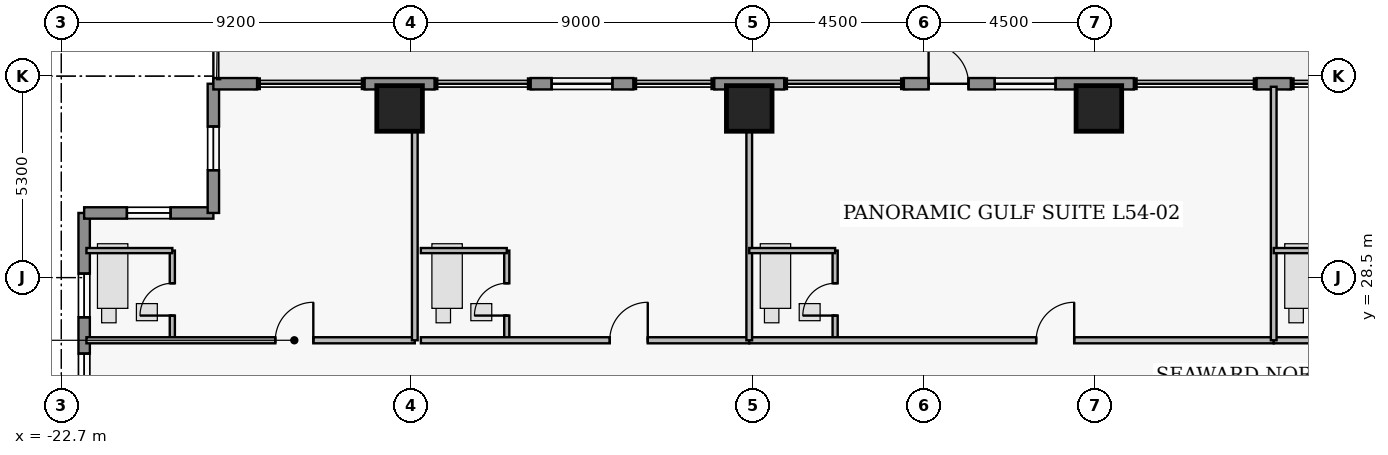
"""IFC4 building model, lengths in metres.
Left out: names, types, materials, properties, quantities, classifications, styles, units other than length and angle.
Written with IfcOpenShell. Run it as: python <this file> out.ifc"""

import sys

from ifc_helpers import new_model, si_unit, direction, frame, frame_2d, origin, origin_2d, place, context, subcontext, project, spatial, rectangle, extrude, element, fill, save


model = new_model("IFC4")
c1 = context("Model", 3, precision=1e-05, world=origin(), true_north=direction((0.0, 1.0)))
c2 = subcontext(c1, "Body", "Model", "MODEL_VIEW")
j1 = project(units=[si_unit("LENGTHUNIT", "METRE"), si_unit("PLANEANGLEUNIT", "RADIAN")], contexts=[c1])
p1 = place(None, origin())
s1 = spatial("IfcSite", under=j1, at=p1, CompositionType="ELEMENT")
p2 = place(p1, origin())
s2 = spatial("IfcBuilding", under=s1, at=p2, CompositionType="ELEMENT")
p3 = place(p2, frame((0.0, 0.0, 214.9)))
s3 = spatial("IfcBuildingStorey", under=s2, at=p3, CompositionType="ELEMENT", Elevation=214.9)
for number, where, z_axis, x_axis in (
    (1, (-13.8, 32.95, 0.0), (0.0, 0.0, 1.0), (1.0, 0.0, 0.0)),
    (2, (-4.6, 32.95, 0.0), (0.0, 0.0, 1.0), (1.0, 0.0, 0.0)),
    (3, (4.6, 32.95, 0.0), (0.0, 0.0, 1.0), (1.0, 0.0, 0.0)),
):
    element("IfcColumn", number, at=place(p3, frame(where, z_axis=z_axis, x_axis=x_axis)), inside=s3, PredefinedType="COLUMN", context=c2, shape_type="SweptSolid", body=[
        extrude(rectangle(XDim=1.2, YDim=1.2, at=origin_2d()), origin(), (0.0, 0.0, 1.0), 3.75),
    ])
p4 = place(p3, frame((-22.1, 24.55, 0.0), z_axis=(0.0, 0.0, 1.0), x_axis=(0.0, 1.0, 0.0)))
e4 = element("IfcWall", 4, at=p4, inside=s3, PredefinedType="STANDARD", context=c2, shape_type="SweptSolid", body=[
    extrude(rectangle(XDim=5.65, YDim=0.3, at=frame_2d((2.825, 0.0))), origin(), (0.0, 0.0, 1.0), 3.53),
])
p5 = place(p4, frame((0.8, 0.0, 0.95)))
e5 = element("IfcOpeningElement", 5, at=p5, cuts=e4, PredefinedType="OPENING", context=c2, shape_type="SweptSolid", body=[
    extrude(rectangle(XDim=1.15, YDim=1.55, at=frame_2d((0.575, 0.775))), frame((0.0, 0.16, 0.0), z_axis=(0.0, -1.0, 0.0), x_axis=(1.0, 0.0, 0.0)), (0.0, 0.0, 1.0), 0.32),
])
p6 = place(p4, frame((2.905, 0.0, 0.95)))
e6 = element("IfcOpeningElement", 6, at=p6, cuts=e4, PredefinedType="OPENING", context=c2, shape_type="SweptSolid", body=[
    extrude(rectangle(XDim=1.15, YDim=1.55, at=frame_2d((0.575, 0.775))), frame((0.0, 0.16, 0.0), z_axis=(0.0, -1.0, 0.0), x_axis=(1.0, 0.0, 0.0)), (0.0, 0.0, 1.0), 0.32),
])
p7 = place(p3, frame((-22.1, 30.2, 0.0), z_axis=(0.0, 0.0, 1.0), x_axis=(1.0, 0.0, 0.0)))
e7 = element("IfcWall", 7, at=p7, inside=s3, PredefinedType="STANDARD", context=c2, shape_type="SweptSolid", body=[
    extrude(rectangle(XDim=3.4, YDim=0.3, at=frame_2d((1.7, 0.0))), origin(), (0.0, 0.0, 1.0), 3.53),
])
p8 = place(p7, frame((1.125, 0.0, 1.25)))
e8 = element("IfcOpeningElement", 8, at=p8, cuts=e7, PredefinedType="OPENING", context=c2, shape_type="SweptSolid", body=[
    extrude(rectangle(XDim=1.15, YDim=1.55, at=frame_2d((0.575, 0.775))), frame((0.0, 0.16, 0.0), z_axis=(0.0, -1.0, 0.0), x_axis=(1.0, 0.0, 0.0)), (0.0, 0.0, 1.0), 0.32),
])
p9 = place(p3, frame((-18.7, 30.2, 0.0), z_axis=(0.0, 0.0, 1.0), x_axis=(0.0, 1.0, 0.0)))
e9 = element("IfcWall", 9, at=p9, inside=s3, PredefinedType="STANDARD", context=c2, shape_type="SweptSolid", body=[
    extrude(rectangle(XDim=3.4, YDim=0.3, at=frame_2d((1.7, 0.0))), origin(), (0.0, 0.0, 1.0), 3.53),
])
p10 = place(p9, frame((1.125, 0.0, 1.25)))
e10 = element("IfcOpeningElement", 10, at=p10, cuts=e9, PredefinedType="OPENING", context=c2, shape_type="SweptSolid", body=[
    extrude(rectangle(XDim=1.15, YDim=1.55, at=frame_2d((0.575, 0.775))), frame((0.0, 0.16, 0.0), z_axis=(0.0, -1.0, 0.0), x_axis=(1.0, 0.0, 0.0)), (0.0, 0.0, 1.0), 0.32),
])
p11 = place(p3, frame((-18.7, 33.6, 0.0), z_axis=(0.0, 0.0, 1.0), x_axis=(1.0, 0.0, 0.0)))
e11 = element("IfcWall", 11, at=p11, inside=s3, PredefinedType="STANDARD", context=c2, shape_type="SweptSolid", body=[
    extrude(rectangle(XDim=1.15, YDim=0.3, at=frame_2d((0.575, 0.0))), origin(), (0.0, 0.0, 1.0), 3.53),
])
p12 = place(p3, frame((-14.72, 33.6, 0.0), z_axis=(0.0, 0.0, 1.0), x_axis=(1.0, 0.0, 0.0)))
e12 = element("IfcWall", 12, at=p12, inside=s3, PredefinedType="STANDARD", context=c2, shape_type="SweptSolid", body=[
    extrude(rectangle(XDim=1.84, YDim=0.3, at=frame_2d((0.92, 0.0))), origin(), (0.0, 0.0, 1.0), 3.53),
])
p13 = place(p3, frame((-10.35, 33.6, 0.0), z_axis=(0.0, 0.0, 1.0), x_axis=(1.0, 0.0, 0.0)))
e13 = element("IfcWall", 13, at=p13, inside=s3, PredefinedType="STANDARD", context=c2, shape_type="SweptSolid", body=[
    extrude(rectangle(XDim=2.7, YDim=0.3, at=frame_2d((1.35, 0.0))), origin(), (0.0, 0.0, 1.0), 3.53),
])
p14 = place(p13, frame((0.55, 0.0, 0.85)))
e14 = element("IfcOpeningElement", 14, at=p14, cuts=e13, PredefinedType="OPENING", context=c2, shape_type="SweptSolid", body=[
    extrude(rectangle(XDim=1.6, YDim=1.8, at=frame_2d((0.8, 0.9))), frame((0.0, 0.16, 0.0), z_axis=(0.0, -1.0, 0.0), x_axis=(1.0, 0.0, 0.0)), (0.0, 0.0, 1.0), 0.32),
])
p15 = place(p3, frame((-5.52, 33.6, 0.0), z_axis=(0.0, 0.0, 1.0), x_axis=(1.0, 0.0, 0.0)))
e15 = element("IfcWall", 15, at=p15, inside=s3, PredefinedType="STANDARD", context=c2, shape_type="SweptSolid", body=[
    extrude(rectangle(XDim=1.84, YDim=0.3, at=frame_2d((0.92, 0.0))), origin(), (0.0, 0.0, 1.0), 3.53),
])
p16 = place(p3, frame((-0.531, 33.6, 0.0), z_axis=(0.0, 0.0, 1.0), x_axis=(1.0, 0.0, 0.0)))
e16 = element("IfcWall", 16, at=p16, inside=s3, PredefinedType="STANDARD", context=c2, shape_type="SweptSolid", body=[
    extrude(rectangle(XDim=6.051, YDim=0.3, at=frame_2d((3.025, 0.0))), origin(), (0.0, 0.0, 1.0), 3.53),
])
p17 = place(p16, frame((0.65, 0.0, 0.0)))
e17 = element("IfcOpeningElement", 17, at=p17, cuts=e16, PredefinedType="OPENING", context=c2, shape_type="SweptSolid", body=[
    extrude(rectangle(XDim=1.05, YDim=2.2, at=frame_2d((0.525, 1.1))), frame((0.0, 0.16, 0.0), z_axis=(0.0, -1.0, 0.0), x_axis=(1.0, 0.0, 0.0)), (0.0, 0.0, 1.0), 0.32),
])
p18 = place(p16, frame((2.39, 0.0, 0.85)))
e18 = element("IfcOpeningElement", 18, at=p18, cuts=e16, PredefinedType="OPENING", context=c2, shape_type="SweptSolid", body=[
    extrude(rectangle(XDim=1.6, YDim=1.8, at=frame_2d((0.8, 0.9))), frame((0.0, 0.16, 0.0), z_axis=(0.0, -1.0, 0.0), x_axis=(1.0, 0.0, 0.0)), (0.0, 0.0, 1.0), 0.32),
])
p19 = place(p3, frame((8.75, 33.6, 0.0), z_axis=(0.0, 0.0, 1.0), x_axis=(1.0, 0.0, 0.0)))
e19 = element("IfcWall", 19, at=p19, inside=s3, PredefinedType="STANDARD", context=c2, shape_type="SweptSolid", body=[
    extrude(rectangle(XDim=0.9, YDim=0.3, at=frame_2d((0.45, 0.0))), origin(), (0.0, 0.0, 1.0), 3.53),
])
p20 = place(p3, frame((-19.78, 26.85, 0.0), z_axis=(0.0, 0.0, 1.0), x_axis=(0.0, 1.0, 0.0)))
e20 = element("IfcWall", 20, at=p20, inside=s3, PredefinedType="PLUMBINGWALL", context=c2, shape_type="SweptSolid", body=[
    extrude(rectangle(XDim=2.36, YDim=0.135, at=frame_2d((1.18, 0.0))), origin(), (0.0, 0.0, 1.0), 3.53),
])
p21 = place(p20, frame((0.65, 0.0, 0.0)))
e21 = element("IfcOpeningElement", 21, at=p21, cuts=e20, PredefinedType="OPENING", context=c2, shape_type="SweptSolid", body=[
    extrude(rectangle(XDim=0.85, YDim=2.1, at=frame_2d((0.425, 1.05))), frame((0.0, 0.077, 0.0), z_axis=(0.0, -1.0, 0.0), x_axis=(1.0, 0.0, 0.0)), (0.0, 0.0, 1.0), 0.155),
])
p22 = place(p3, frame((-22.04, 26.85, 0.0), z_axis=(0.0, 0.0, 1.0), x_axis=(1.0, 0.0, 0.0)))
e22 = element("IfcWall", 22, at=p22, inside=s3, PredefinedType="PARTITIONING", context=c2, shape_type="SweptSolid", body=[
    extrude(rectangle(XDim=8.64, YDim=0.16, at=frame_2d((4.32, 0.0))), origin(), (0.0, 0.0, 1.0), 3.53),
])
p23 = place(p22, frame((4.97, 0.0, 0.0)))
e23 = element("IfcOpeningElement", 23, at=p23, cuts=e22, PredefinedType="OPENING", context=c2, shape_type="SweptSolid", body=[
    extrude(rectangle(XDim=1.0, YDim=2.15, at=frame_2d((0.5, 1.075))), frame((0.0, 0.09, 0.0), z_axis=(0.0, -1.0, 0.0), x_axis=(1.0, 0.0, 0.0)), (0.0, 0.0, 1.0), 0.18),
])
p24 = place(p3, frame((-10.98, 26.85, 0.0), z_axis=(0.0, 0.0, 1.0), x_axis=(0.0, 1.0, 0.0)))
e24 = element("IfcWall", 24, at=p24, inside=s3, PredefinedType="PLUMBINGWALL", context=c2, shape_type="SweptSolid", body=[
    extrude(rectangle(XDim=2.36, YDim=0.135, at=frame_2d((1.18, 0.0))), origin(), (0.0, 0.0, 1.0), 3.53),
])
p25 = place(p24, frame((0.65, 0.0, 0.0)))
e25 = element("IfcOpeningElement", 25, at=p25, cuts=e24, PredefinedType="OPENING", context=c2, shape_type="SweptSolid", body=[
    extrude(rectangle(XDim=0.85, YDim=2.1, at=frame_2d((0.425, 1.05))), frame((0.0, 0.077, 0.0), z_axis=(0.0, -1.0, 0.0), x_axis=(1.0, 0.0, 0.0)), (0.0, 0.0, 1.0), 0.155),
])
p26 = place(p3, frame((-13.24, 26.85, 0.0), z_axis=(0.0, 0.0, 1.0), x_axis=(1.0, 0.0, 0.0)))
e26 = element("IfcWall", 26, at=p26, inside=s3, PredefinedType="PARTITIONING", context=c2, shape_type="SweptSolid", body=[
    extrude(rectangle(XDim=8.64, YDim=0.16, at=frame_2d((4.32, 0.0))), origin(), (0.0, 0.0, 1.0), 3.53),
])
p27 = place(p26, frame((4.97, 0.0, 0.0)))
e27 = element("IfcOpeningElement", 27, at=p27, cuts=e26, PredefinedType="OPENING", context=c2, shape_type="SweptSolid", body=[
    extrude(rectangle(XDim=1.0, YDim=2.15, at=frame_2d((0.5, 1.075))), frame((0.0, 0.09, 0.0), z_axis=(0.0, -1.0, 0.0), x_axis=(1.0, 0.0, 0.0)), (0.0, 0.0, 1.0), 0.18),
])
p28 = place(p3, frame((-2.34, 26.85, 0.0), z_axis=(0.0, 0.0, 1.0), x_axis=(0.0, 1.0, 0.0)))
e28 = element("IfcWall", 28, at=p28, inside=s3, PredefinedType="PLUMBINGWALL", context=c2, shape_type="SweptSolid", body=[
    extrude(rectangle(XDim=2.36, YDim=0.135, at=frame_2d((1.18, 0.0))), origin(), (0.0, 0.0, 1.0), 3.53),
])
p29 = place(p28, frame((0.65, 0.0, 0.0)))
e29 = element("IfcOpeningElement", 29, at=p29, cuts=e28, PredefinedType="OPENING", context=c2, shape_type="SweptSolid", body=[
    extrude(rectangle(XDim=0.85, YDim=2.1, at=frame_2d((0.425, 1.05))), frame((0.0, 0.077, 0.0), z_axis=(0.0, -1.0, 0.0), x_axis=(1.0, 0.0, 0.0)), (0.0, 0.0, 1.0), 0.155),
])
p30 = place(p3, frame((-4.6, 26.85, 0.0), z_axis=(0.0, 0.0, 1.0), x_axis=(1.0, 0.0, 0.0)))
e30 = element("IfcWall", 30, at=p30, inside=s3, PredefinedType="PARTITIONING", context=c2, shape_type="SweptSolid", body=[
    extrude(rectangle(XDim=13.8, YDim=0.16, at=frame_2d((6.9, 0.0))), origin(), (0.0, 0.0, 1.0), 3.53),
])
p31 = place(p30, frame((7.55, 0.0, 0.0)))
e31 = element("IfcOpeningElement", 31, at=p31, cuts=e30, PredefinedType="OPENING", context=c2, shape_type="SweptSolid", body=[
    extrude(rectangle(XDim=1.0, YDim=2.15, at=frame_2d((0.5, 1.075))), frame((0.0, 0.09, 0.0), z_axis=(0.0, -1.0, 0.0), x_axis=(1.0, 0.0, 0.0)), (0.0, 0.0, 1.0), 0.18),
])
p32 = place(p3, frame((9.2, 26.85, 0.0), z_axis=(0.0, 0.0, 1.0), x_axis=(1.0, 0.0, 0.0)))
e32 = element("IfcWall", 32, at=p32, inside=s3, PredefinedType="PARTITIONING", context=c2, shape_type="SweptSolid", body=[
    extrude(rectangle(XDim=12.84, YDim=0.16, at=frame_2d((6.42, 0.0))), origin(), (0.0, 0.0, 1.0), 3.53),
])
p33 = place(p32, frame((7.07, 0.0, 0.0)))
e33 = element("IfcOpeningElement", 33, at=p33, cuts=e32, PredefinedType="OPENING", context=c2, shape_type="SweptSolid", body=[
    extrude(rectangle(XDim=1.0, YDim=2.15, at=frame_2d((0.5, 1.075))), frame((0.0, 0.09, 0.0), z_axis=(0.0, -1.0, 0.0), x_axis=(1.0, 0.0, 0.0)), (0.0, 0.0, 1.0), 0.18),
])
p34 = place(p3, frame((-22.04, 29.21, 0.0), z_axis=(0.0, 0.0, 1.0), x_axis=(1.0, 0.0, 0.0)))
e34 = element("IfcWall", 34, at=p34, inside=s3, PredefinedType="PLUMBINGWALL", context=c2, shape_type="SweptSolid", body=[
    extrude(rectangle(XDim=2.26, YDim=0.135, at=frame_2d((1.13, 0.0))), origin(), (0.0, 0.0, 1.0), 3.53),
])
p35 = place(p3, frame((-13.4, 26.85, 0.0), z_axis=(0.0, 0.0, 1.0), x_axis=(0.0, 1.0, 0.0)))
e35 = element("IfcWall", 35, at=p35, inside=s3, PredefinedType="PARTITIONING", context=c2, shape_type="SweptSolid", body=[
    extrude(rectangle(XDim=6.67, YDim=0.15, at=frame_2d((3.335, 0.0))), origin(), (0.0, 0.0, 1.0), 2.519),
])
p36 = place(p3, frame((-13.24, 29.21, 0.0), z_axis=(0.0, 0.0, 1.0), x_axis=(1.0, 0.0, 0.0)))
e36 = element("IfcWall", 36, at=p36, inside=s3, PredefinedType="PLUMBINGWALL", context=c2, shape_type="SweptSolid", body=[
    extrude(rectangle(XDim=2.26, YDim=0.135, at=frame_2d((1.13, 0.0))), origin(), (0.0, 0.0, 1.0), 3.53),
])
p37 = place(p3, frame((-4.6, 26.85, 0.0), z_axis=(0.0, 0.0, 1.0), x_axis=(0.0, 1.0, 0.0)))
e37 = element("IfcWall", 37, at=p37, inside=s3, PredefinedType="PARTITIONING", context=c2, shape_type="SweptSolid", body=[
    extrude(rectangle(XDim=6.67, YDim=0.15, at=frame_2d((3.335, 0.0))), origin(), (0.0, 0.0, 1.0), 2.519),
])
p38 = place(p3, frame((-4.6, 29.21, 0.0), z_axis=(0.0, 0.0, 1.0), x_axis=(1.0, 0.0, 0.0)))
e38 = element("IfcWall", 38, at=p38, inside=s3, PredefinedType="PLUMBINGWALL", context=c2, shape_type="SweptSolid", body=[
    extrude(rectangle(XDim=2.26, YDim=0.135, at=frame_2d((1.13, 0.0))), origin(), (0.0, 0.0, 1.0), 3.53),
])
p39 = place(p3, frame((9.2, 26.85, 0.0), z_axis=(0.0, 0.0, 1.0), x_axis=(0.0, 1.0, 0.0)))
e39 = element("IfcWall", 39, at=p39, inside=s3, PredefinedType="PARTITIONING", context=c2, shape_type="SweptSolid", body=[
    extrude(rectangle(XDim=6.67, YDim=0.15, at=frame_2d((3.335, 0.0))), origin(), (0.0, 0.0, 1.0), 3.53),
])
p40 = place(p3, frame((9.2, 29.21, 0.0), z_axis=(0.0, 0.0, 1.0), x_axis=(1.0, 0.0, 0.0)))
e40 = element("IfcWall", 40, at=p40, inside=s3, PredefinedType="PLUMBINGWALL", context=c2, shape_type="SweptSolid", body=[
    extrude(rectangle(XDim=2.26, YDim=0.135, at=frame_2d((1.13, 0.0))), origin(), (0.0, 0.0, 1.0), 3.53),
])
p41 = place(p5, origin())
e41 = element("IfcWindow", 41, at=p41, inside=s3, PartitioningType="SINGLE_PANEL", PredefinedType="WINDOW", context=c2, shape_type="SweptSolid", body=[
    extrude(rectangle(XDim=1.15, YDim=1.55, at=frame_2d((0.575, 0.775))), frame((0.0, 0.03, 0.0), z_axis=(0.0, -1.0, 0.0), x_axis=(1.0, 0.0, 0.0)), (0.0, 0.0, 1.0), 0.06),
])
fill(e5, e41)
p42 = place(p6, origin())
e42 = element("IfcWindow", 42, at=p42, inside=s3, PartitioningType="SINGLE_PANEL", PredefinedType="WINDOW", context=c2, shape_type="SweptSolid", body=[
    extrude(rectangle(XDim=1.15, YDim=1.55, at=frame_2d((0.575, 0.775))), frame((0.0, 0.03, 0.0), z_axis=(0.0, -1.0, 0.0), x_axis=(1.0, 0.0, 0.0)), (0.0, 0.0, 1.0), 0.06),
])
fill(e6, e42)
p43 = place(p8, origin())
e43 = element("IfcWindow", 43, at=p43, inside=s3, PartitioningType="SINGLE_PANEL", PredefinedType="WINDOW", context=c2, shape_type="SweptSolid", body=[
    extrude(rectangle(XDim=1.15, YDim=1.55, at=frame_2d((0.575, 0.775))), frame((0.0, 0.03, 0.0), z_axis=(0.0, -1.0, 0.0), x_axis=(1.0, 0.0, 0.0)), (0.0, 0.0, 1.0), 0.06),
])
fill(e8, e43)
p44 = place(p10, origin())
e44 = element("IfcWindow", 44, at=p44, inside=s3, PartitioningType="SINGLE_PANEL", PredefinedType="WINDOW", context=c2, shape_type="SweptSolid", body=[
    extrude(rectangle(XDim=1.15, YDim=1.55, at=frame_2d((0.575, 0.775))), frame((0.0, 0.03, 0.0), z_axis=(0.0, -1.0, 0.0), x_axis=(1.0, 0.0, 0.0)), (0.0, 0.0, 1.0), 0.06),
])
fill(e10, e44)
p45 = place(p14, origin())
e45 = element("IfcWindow", 45, at=p45, inside=s3, PartitioningType="SINGLE_PANEL", PredefinedType="WINDOW", context=c2, shape_type="SweptSolid", body=[
    extrude(rectangle(XDim=1.6, YDim=1.8, at=frame_2d((0.8, 0.9))), frame((0.0, 0.03, 0.0), z_axis=(0.0, -1.0, 0.0), x_axis=(1.0, 0.0, 0.0)), (0.0, 0.0, 1.0), 0.06),
])
fill(e14, e45)
p46 = place(p17, origin())
e46 = element("IfcDoor", 46, at=p46, inside=s3, OperationType="SINGLE_SWING_LEFT", PredefinedType="DOOR", context=c2, shape_type="SweptSolid", body=[
    extrude(rectangle(XDim=1.05, YDim=2.2, at=frame_2d((0.525, 1.1))), frame((0.0, 0.025, 0.0), z_axis=(0.0, -1.0, 0.0), x_axis=(1.0, 0.0, 0.0)), (0.0, 0.0, 1.0), 0.05),
])
fill(e17, e46)
p47 = place(p18, origin())
e47 = element("IfcWindow", 47, at=p47, inside=s3, PartitioningType="SINGLE_PANEL", PredefinedType="WINDOW", context=c2, shape_type="SweptSolid", body=[
    extrude(rectangle(XDim=1.6, YDim=1.8, at=frame_2d((0.8, 0.9))), frame((0.0, 0.03, 0.0), z_axis=(0.0, -1.0, 0.0), x_axis=(1.0, 0.0, 0.0)), (0.0, 0.0, 1.0), 0.06),
])
fill(e18, e47)
p48 = place(p21, origin())
e48 = element("IfcDoor", 48, at=p48, inside=s3, OperationType="SINGLE_SWING_LEFT", PredefinedType="DOOR", context=c2, shape_type="SweptSolid", body=[
    extrude(rectangle(XDim=0.85, YDim=2.1, at=frame_2d((0.425, 1.05))), frame((0.0, 0.025, 0.0), z_axis=(0.0, -1.0, 0.0), x_axis=(1.0, 0.0, 0.0)), (0.0, 0.0, 1.0), 0.05),
])
fill(e21, e48)
p49 = place(p23, origin())
e49 = element("IfcDoor", 49, at=p49, inside=s3, OperationType="SINGLE_SWING_RIGHT", PredefinedType="DOOR", context=c2, shape_type="SweptSolid", body=[
    extrude(rectangle(XDim=1.0, YDim=2.15, at=frame_2d((0.5, 1.075))), frame((0.0, 0.025, 0.0), z_axis=(0.0, -1.0, 0.0), x_axis=(1.0, 0.0, 0.0)), (0.0, 0.0, 1.0), 0.05),
])
fill(e23, e49)
p50 = place(p25, origin())
e50 = element("IfcDoor", 50, at=p50, inside=s3, OperationType="SINGLE_SWING_LEFT", PredefinedType="DOOR", context=c2, shape_type="SweptSolid", body=[
    extrude(rectangle(XDim=0.85, YDim=2.1, at=frame_2d((0.425, 1.05))), frame((0.0, 0.025, 0.0), z_axis=(0.0, -1.0, 0.0), x_axis=(1.0, 0.0, 0.0)), (0.0, 0.0, 1.0), 0.05),
])
fill(e25, e50)
p51 = place(p27, origin())
e51 = element("IfcDoor", 51, at=p51, inside=s3, OperationType="SINGLE_SWING_RIGHT", PredefinedType="DOOR", context=c2, shape_type="SweptSolid", body=[
    extrude(rectangle(XDim=1.0, YDim=2.15, at=frame_2d((0.5, 1.075))), frame((0.0, 0.025, 0.0), z_axis=(0.0, -1.0, 0.0), x_axis=(1.0, 0.0, 0.0)), (0.0, 0.0, 1.0), 0.05),
])
fill(e27, e51)
p52 = place(p29, origin())
e52 = element("IfcDoor", 52, at=p52, inside=s3, OperationType="SINGLE_SWING_LEFT", PredefinedType="DOOR", context=c2, shape_type="SweptSolid", body=[
    extrude(rectangle(XDim=0.85, YDim=2.1, at=frame_2d((0.425, 1.05))), frame((0.0, 0.025, 0.0), z_axis=(0.0, -1.0, 0.0), x_axis=(1.0, 0.0, 0.0)), (0.0, 0.0, 1.0), 0.05),
])
fill(e29, e52)
p53 = place(p31, origin())
e53 = element("IfcDoor", 53, at=p53, inside=s3, OperationType="SINGLE_SWING_RIGHT", PredefinedType="DOOR", context=c2, shape_type="SweptSolid", body=[
    extrude(rectangle(XDim=1.0, YDim=2.15, at=frame_2d((0.5, 1.075))), frame((0.0, 0.025, 0.0), z_axis=(0.0, -1.0, 0.0), x_axis=(1.0, 0.0, 0.0)), (0.0, 0.0, 1.0), 0.05),
])
fill(e31, e53)
save(model, sys.argv[1])
